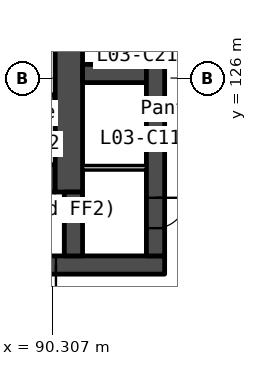
"""IFC4 building model, lengths in metres.
Left out: names, types, materials, properties, quantities, classifications, styles, units other than length and angle.
Written with IfcOpenShell. Run it as: python <this file> out.ifc"""

import sys

from ifc_helpers import new_model, si_unit, direction, frame, frame_2d, origin, place, context, subcontext, project, spatial, rectangle, extrude, element, fill, save


model = new_model("IFC4")
c1 = context("Model", 3, precision=1e-05, world=origin(), true_north=direction((0.0, 1.0)))
c2 = subcontext(c1, "Body", "Model", "MODEL_VIEW")
j1 = project(units=[si_unit("LENGTHUNIT", "METRE"), si_unit("PLANEANGLEUNIT", "RADIAN")], contexts=[c1])
p1 = place(None, origin())
s1 = spatial("IfcSite", under=j1, at=p1, CompositionType="ELEMENT")
p2 = place(p1, origin())
s2 = spatial("IfcBuilding", under=s1, at=p2, CompositionType="ELEMENT")
p3 = place(p2, frame((0.0, 0.0, 19.5)))
s3 = spatial("IfcBuildingStorey", under=s2, at=p3, CompositionType="ELEMENT", Elevation=19.5)
p4 = place(p3, frame((66.0, 119.85, 0.0), z_axis=(0.0, 0.0, 1.0), x_axis=(1.0, 0.0, 0.0)))
e1 = element("IfcWall", 1, at=p4, inside=s3, PredefinedType="SOLIDWALL", context=c2, shape_type="SweptSolid", body=[
    extrude(rectangle(XDim=28.0, YDim=0.6, at=frame_2d((14.0, 0.0))), origin(), (0.0, 0.0, 1.0), 5.25),
])
p5 = place(p4, frame((6.825, 0.0, 0.0)))
e2 = element("IfcOpeningElement", 2, at=p5, cuts=e1, PredefinedType="OPENING", context=c2, shape_type="SweptSolid", body=[
    extrude(rectangle(XDim=1.8, YDim=2.1, at=frame_2d((0.9, 1.05))), frame((0.0, 0.31, 0.0), z_axis=(0.0, -1.0, 0.0), x_axis=(1.0, 0.0, 0.0)), (0.0, 0.0, 1.0), 0.62),
])
p6 = place(p4, frame((15.85, 0.0, 0.0)))
e3 = element("IfcOpeningElement", 3, at=p6, cuts=e1, PredefinedType="OPENING", context=c2, shape_type="SweptSolid", body=[
    extrude(rectangle(XDim=1.5, YDim=2.1, at=frame_2d((0.75, 1.05))), frame((0.0, 0.31, 0.0), z_axis=(0.0, -1.0, 0.0), x_axis=(1.0, 0.0, 0.0)), (0.0, 0.0, 1.0), 0.62),
])
p7 = place(p4, frame((19.375, 0.0, 0.0)))
e4 = element("IfcOpeningElement", 4, at=p7, cuts=e1, PredefinedType="OPENING", context=c2, shape_type="SweptSolid", body=[
    extrude(rectangle(XDim=1.8, YDim=2.1, at=frame_2d((0.9, 1.05))), frame((0.0, 0.31, 0.0), z_axis=(0.0, -1.0, 0.0), x_axis=(1.0, 0.0, 0.0)), (0.0, 0.0, 1.0), 0.62),
])
p8 = place(p4, frame((4.425, 0.0, 0.0)))
e5 = element("IfcOpeningElement", 5, at=p8, cuts=e1, PredefinedType="OPENING", context=c2, shape_type="SweptSolid", body=[
    extrude(rectangle(XDim=1.0, YDim=2.1, at=frame_2d((0.5, 1.05))), frame((0.0, 0.31, 0.0), z_axis=(0.0, -1.0, 0.0), x_axis=(1.0, 0.0, 0.0)), (0.0, 0.0, 1.0), 0.62),
])
p9 = place(p4, frame((9.783, 0.0, 0.0)))
e6 = element("IfcOpeningElement", 6, at=p9, cuts=e1, PredefinedType="OPENING", context=c2, shape_type="SweptSolid", body=[
    extrude(rectangle(XDim=1.0, YDim=2.1, at=frame_2d((0.5, 1.05))), frame((0.0, 0.31, 0.0), z_axis=(0.0, -1.0, 0.0), x_axis=(1.0, 0.0, 0.0)), (0.0, 0.0, 1.0), 0.62),
])
p10 = place(p4, frame((11.525, 0.0, 0.0)))
e7 = element("IfcOpeningElement", 7, at=p10, cuts=e1, PredefinedType="OPENING", context=c2, shape_type="SweptSolid", body=[
    extrude(rectangle(XDim=1.0, YDim=2.1, at=frame_2d((0.5, 1.05))), frame((0.0, 0.31, 0.0), z_axis=(0.0, -1.0, 0.0), x_axis=(1.0, 0.0, 0.0)), (0.0, 0.0, 1.0), 0.62),
])
p11 = place(p4, frame((13.658, 0.0, 0.0)))
e8 = element("IfcOpeningElement", 8, at=p11, cuts=e1, PredefinedType="OPENING", context=c2, shape_type="SweptSolid", body=[
    extrude(rectangle(XDim=1.0, YDim=2.1, at=frame_2d((0.5, 1.05))), frame((0.0, 0.31, 0.0), z_axis=(0.0, -1.0, 0.0), x_axis=(1.0, 0.0, 0.0)), (0.0, 0.0, 1.0), 0.62),
])
p12 = place(p4, frame((21.725, 0.0, 0.0)))
e9 = element("IfcOpeningElement", 9, at=p12, cuts=e1, PredefinedType="OPENING", context=c2, shape_type="SweptSolid", body=[
    extrude(rectangle(XDim=1.0, YDim=2.1, at=frame_2d((0.5, 1.05))), frame((0.0, 0.31, 0.0), z_axis=(0.0, -1.0, 0.0), x_axis=(1.0, 0.0, 0.0)), (0.0, 0.0, 1.0), 0.62),
])
p13 = place(p4, frame((23.425, 0.0, 0.0)))
e10 = element("IfcOpeningElement", 10, at=p13, cuts=e1, PredefinedType="OPENING", context=c2, shape_type="SweptSolid", body=[
    extrude(rectangle(XDim=1.0, YDim=2.1, at=frame_2d((0.5, 1.05))), frame((0.0, 0.31, 0.0), z_axis=(0.0, -1.0, 0.0), x_axis=(1.0, 0.0, 0.0)), (0.0, 0.0, 1.0), 0.62),
])
p14 = place(p3, frame((87.85, 125.3, 0.0), z_axis=(0.0, 0.0, 1.0), x_axis=(1.0, 0.0, 0.0)))
e11 = element("IfcWall", 11, at=p14, inside=s3, PredefinedType="SOLIDWALL", context=c2, shape_type="SweptSolid", body=[
    extrude(rectangle(XDim=2.55, YDim=0.3, at=frame_2d((1.275, 0.0))), origin(), (0.0, 0.0, 1.0), 5.25),
])
p15 = place(p3, frame((87.85, 122.7, 0.0), z_axis=(0.0, 0.0, 1.0), x_axis=(1.0, 0.0, 0.0)))
e12 = element("IfcWall", 12, at=p15, inside=s3, PredefinedType="SOLIDWALL", context=c2, shape_type="SweptSolid", body=[
    extrude(rectangle(XDim=2.55, YDim=0.9, at=frame_2d((1.275, 0.0))), origin(), (0.0, 0.0, 1.0), 5.25),
])
p16 = place(p3, frame((90.85, 133.95, 0.0), z_axis=(0.0, 0.0, 1.0), x_axis=(0.0, -1.0, 0.0)))
e13 = element("IfcWall", 13, at=p16, inside=s3, PredefinedType="SOLIDWALL", context=c2, shape_type="SweptSolid", body=[
    extrude(rectangle(XDim=11.7, YDim=0.9, at=frame_2d((5.85, 0.0))), origin(), (0.0, 0.0, 1.0), 5.25),
])
p17 = place(p3, frame((91.0, 122.25, 0.0), z_axis=(0.0, 0.0, 1.0), x_axis=(0.0, -1.0, 0.0)))
e14 = element("IfcWall", 14, at=p17, inside=s3, PredefinedType="SOLIDWALL", context=c2, shape_type="SweptSolid", body=[
    extrude(rectangle(XDim=2.1, YDim=0.6, at=frame_2d((1.05, 0.0))), origin(), (0.0, 0.0, 1.0), 5.25),
])
p18 = place(p3, frame((91.3, 126.15, 0.0), z_axis=(0.0, 0.0, 1.0), x_axis=(1.0, 0.0, 0.0)))
e15 = element("IfcWall", 15, at=p18, inside=s3, PredefinedType="SOLIDWALL", context=c2, shape_type="SweptSolid", body=[
    extrude(rectangle(XDim=2.1, YDim=0.6, at=frame_2d((1.05, 0.0))), origin(), (0.0, 0.0, 1.0), 5.25),
])
p19 = place(p3, frame((91.3, 123.049, 0.0), z_axis=(0.0, 0.0, 1.0), x_axis=(1.0, 0.0, 0.0)))
e16 = element("IfcWall", 16, at=p19, inside=s3, PredefinedType="PARTITIONING", context=c2, shape_type="SweptSolid", body=[
    extrude(rectangle(XDim=2.1, YDim=0.15, at=frame_2d((1.05, 0.0))), origin(), (0.0, 0.0, 1.0), 5.25),
])
p20 = place(p3, frame((93.7, 133.95, 0.0), z_axis=(0.0, 0.0, 1.0), x_axis=(0.0, -1.0, 0.0)))
e17 = element("IfcWall", 17, at=p20, inside=s3, PredefinedType="SOLIDWALL", context=c2, shape_type="SweptSolid", body=[
    extrude(rectangle(XDim=13.8, YDim=0.6, at=frame_2d((6.9, 0.0))), origin(), (0.0, 0.0, 1.0), 5.25),
])
p21 = place(p20, frame((0.6, 0.0, 0.0)))
e18 = element("IfcOpeningElement", 18, at=p21, cuts=e17, PredefinedType="OPENING", context=c2, shape_type="SweptSolid", body=[
    extrude(rectangle(XDim=1.1, YDim=2.1, at=frame_2d((0.55, 1.05))), frame((0.0, 0.31, 0.0), z_axis=(0.0, -1.0, 0.0), x_axis=(1.0, 0.0, 0.0)), (0.0, 0.0, 1.0), 0.62),
])
p22 = place(p20, frame((8.963, 0.0, 0.0)))
e19 = element("IfcOpeningElement", 19, at=p22, cuts=e17, PredefinedType="OPENING", context=c2, shape_type="SweptSolid", body=[
    extrude(rectangle(XDim=1.0, YDim=2.1, at=frame_2d((0.5, 1.05))), frame((0.0, 0.31, 0.0), z_axis=(0.0, -1.0, 0.0), x_axis=(1.0, 0.0, 0.0)), (0.0, 0.0, 1.0), 0.62),
])
p23 = place(p20, frame((11.888, 0.0, 0.0)))
e20 = element("IfcOpeningElement", 20, at=p23, cuts=e17, PredefinedType="OPENING", context=c2, shape_type="SweptSolid", body=[
    extrude(rectangle(XDim=1.0, YDim=2.1, at=frame_2d((0.5, 1.05))), frame((0.0, 0.31, 0.0), z_axis=(0.0, -1.0, 0.0), x_axis=(1.0, 0.0, 0.0)), (0.0, 0.0, 1.0), 0.62),
])
p24 = place(p3, frame((127.528, 129.091, 0.0), z_axis=(0.0, 0.0, 1.0), x_axis=(-0.500001590908, -0.866024485271, 0.0)))
e21 = element("IfcWall", 21, at=p24, inside=s3, PredefinedType="STANDARD", context=c2, shape_type="SweptSolid", body=[
    extrude(rectangle(XDim=89.388, YDim=1.0, at=frame_2d((44.694, 0.0))), origin(), (0.0, 0.0, 1.0), 0.6),
])
p25 = place(p22, origin())
e22 = element("IfcDoor", 22, at=p25, inside=s3, OperationType="SINGLE_SWING_LEFT", PredefinedType="DOOR", context=c2, shape_type="SweptSolid", body=[
    extrude(rectangle(XDim=1.0, YDim=2.1, at=frame_2d((0.5, 1.05))), frame((0.0, 0.025, 0.0), z_axis=(0.0, -1.0, 0.0), x_axis=(1.0, 0.0, 0.0)), (0.0, 0.0, 1.0), 0.05),
])
fill(e19, e22)
p26 = place(p23, origin())
e23 = element("IfcDoor", 23, at=p26, inside=s3, OperationType="SINGLE_SWING_LEFT", PredefinedType="DOOR", context=c2, shape_type="SweptSolid", body=[
    extrude(rectangle(XDim=1.0, YDim=2.1, at=frame_2d((0.5, 1.05))), frame((0.0, 0.025, 0.0), z_axis=(0.0, -1.0, 0.0), x_axis=(1.0, 0.0, 0.0)), (0.0, 0.0, 1.0), 0.05),
])
fill(e20, e23)
p27 = place(p13, origin())
e24 = element("IfcDoor", 24, at=p27, inside=s3, OperationType="SINGLE_SWING_RIGHT", PredefinedType="DOOR", context=c2, shape_type="SweptSolid", body=[
    extrude(rectangle(XDim=1.0, YDim=2.1, at=frame_2d((0.5, 1.05))), frame((0.0, 0.025, 0.0), z_axis=(0.0, -1.0, 0.0), x_axis=(1.0, 0.0, 0.0)), (0.0, 0.0, 1.0), 0.05),
])
fill(e10, e24)
save(model, sys.argv[1])
